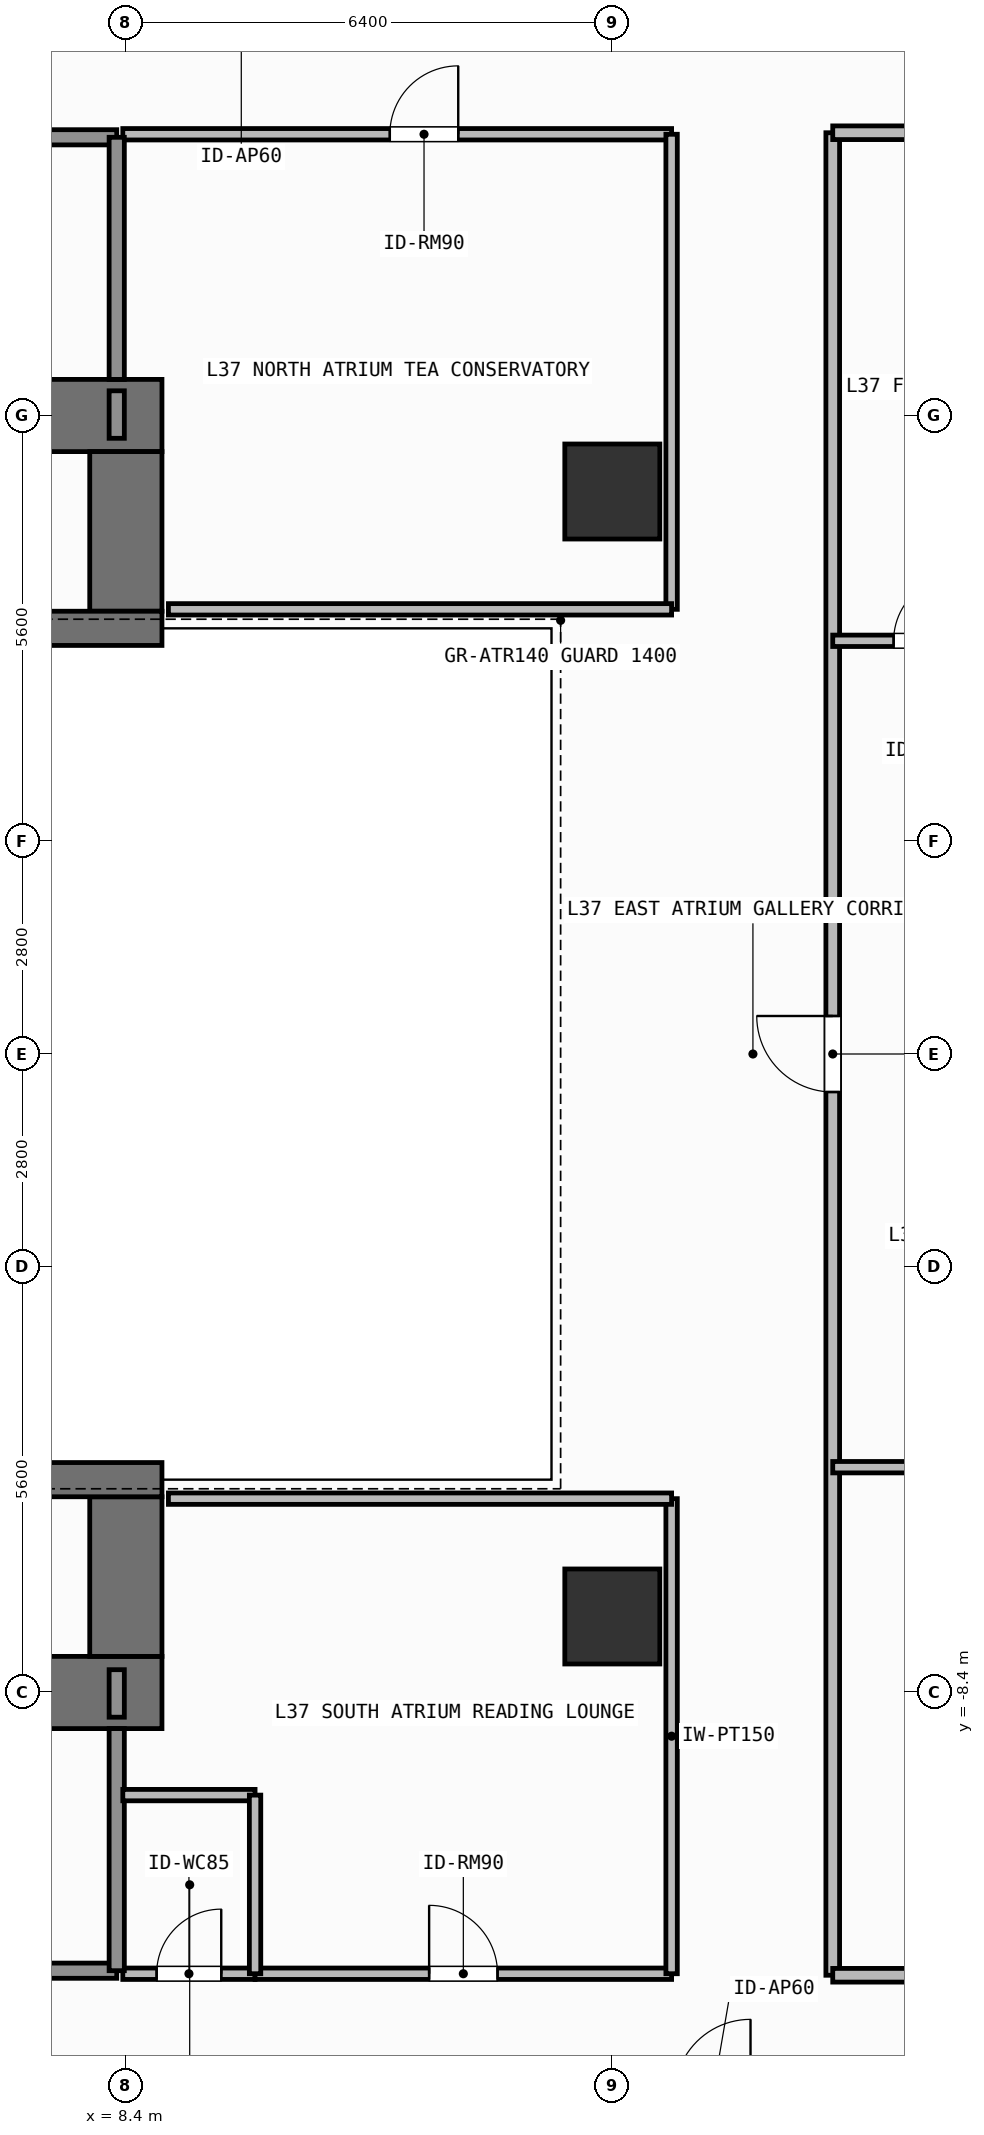
"""IFC4 building model, lengths in metres.
Left out: names, types, materials, properties, quantities, classifications, styles, units other than length and angle.
Written with IfcOpenShell. Run it as: python <this file> out.ifc"""

import sys

from ifc_helpers import new_model, si_unit, direction, frame, frame_2d, origin, origin_2d, place, context, subcontext, project, spatial, rectangle, extrude, element, fill, save


model = new_model("IFC4")
c1 = context("Model", 3, precision=1e-05, world=origin(), true_north=direction((0.0, 1.0)))
c2 = subcontext(c1, "Body", "Model", "MODEL_VIEW")
j1 = project(units=[si_unit("LENGTHUNIT", "METRE"), si_unit("PLANEANGLEUNIT", "RADIAN")], contexts=[c1])
p1 = place(None, origin())
s1 = spatial("IfcSite", under=j1, at=p1, CompositionType="ELEMENT")
p2 = place(p1, origin())
s2 = spatial("IfcBuilding", under=s1, at=p2, CompositionType="ELEMENT")
p3 = place(p2, frame((0.0, 0.0, 148.5)))
s3 = spatial("IfcBuildingStorey", under=s2, at=p3, CompositionType="ELEMENT", Elevation=148.5)
p4 = place(p3, frame((6.12, -8.4, 0.0), z_axis=(0.0, 0.0, 1.0), x_axis=(1.0, 0.0, 0.0)))
e1 = element("IfcWall", 1, at=p4, inside=s3, PredefinedType="SHEAR", context=c2, shape_type="SweptSolid", body=[
    extrude(rectangle(XDim=2.755, YDim=0.95, at=frame_2d((1.377, 0.0))), origin(), (0.0, 0.0, 1.0), 3.9),
])
p5 = place(p3, frame((-7.55, 8.4, 0.0), z_axis=(0.0, 0.0, 1.0), x_axis=(1.0, 0.0, 0.0)))
e2 = element("IfcWall", 2, at=p5, inside=s3, PredefinedType="SHEAR", context=c2, shape_type="SweptSolid", body=[
    extrude(rectangle(XDim=16.425, YDim=0.95, at=frame_2d((8.212, 0.0))), origin(), (0.0, 0.0, 1.0), 3.9),
])
for number, where, z_axis, x_axis in (
    (3, (8.4, -7.925, 0.0), (0.0, 0.0, 1.0), (0.0, 1.0, 0.0)),
    (4, (8.4, 5.825, 0.0), (0.0, 0.0, 1.0), (0.0, 1.0, 0.0)),
):
    element("IfcWall", number, at=place(p3, frame(where, z_axis=z_axis, x_axis=x_axis)), inside=s3, PredefinedType="SHEAR", context=c2, shape_type="SweptSolid", body=[
        extrude(rectangle(XDim=2.1, YDim=0.95, at=frame_2d((1.05, 0.0))), origin(), (0.0, 0.0, 1.0), 3.9),
    ])
for number, where, z_axis, x_axis in (
    (5, (3.045, -5.6, 0.0), (0.0, 0.0, 1.0), (1.0, 0.0, 0.0)),
    (6, (3.045, 5.6, 0.0), (0.0, 0.0, 1.0), (1.0, 0.0, 0.0)),
):
    element("IfcWall", number, at=place(p3, frame(where, z_axis=z_axis, x_axis=x_axis)), inside=s3, PredefinedType="SHEAR", context=c2, shape_type="SweptSolid", body=[
        extrude(rectangle(XDim=5.83, YDim=0.45, at=frame_2d((2.915, 0.0))), origin(), (0.0, 0.0, 1.0), 3.9),
    ])
for number, where, z_axis, x_axis in (
    (7, (14.8, -7.4, 0.0), (0.0, 0.0, 1.0), (1.0, 0.0, 0.0)),
    (8, (14.8, 7.4, 0.0), (0.0, 0.0, 1.0), (1.0, 0.0, 0.0)),
):
    element("IfcColumn", number, at=place(p3, frame(where, z_axis=z_axis, x_axis=x_axis)), inside=s3, PredefinedType="COLUMN", context=c2, shape_type="SweptSolid", body=[
        extrude(rectangle(XDim=1.25, YDim=1.25, at=origin_2d()), origin(), (0.0, 0.0, 1.0), 3.9),
    ])
p6 = place(p3, frame((4.58, -12.06, 0.0), z_axis=(0.0, 0.0, 1.0), x_axis=(1.0, 0.0, 0.0)))
e9 = element("IfcWall", 9, at=p6, inside=s3, PredefinedType="SOLIDWALL", context=c2, shape_type="SweptSolid", body=[
    extrude(rectangle(XDim=3.7, YDim=0.2, at=frame_2d((1.85, 0.0))), origin(), (0.0, 0.0, 1.0), 3.68),
])
p7 = place(p6, frame((1.212, 0.0, 0.0)))
e10 = element("IfcOpeningElement", 10, at=p7, cuts=e9, PredefinedType="OPENING", context=c2, shape_type="SweptSolid", body=[
    extrude(rectangle(XDim=1.1, YDim=2.15, at=frame_2d((0.55, 1.075))), frame((0.0, 0.11, 0.0), z_axis=(0.0, -1.0, 0.0), x_axis=(1.0, 0.0, 0.0)), (0.0, 0.0, 1.0), 0.22),
])
p8 = place(p3, frame((4.58, 12.06, 0.0), z_axis=(0.0, 0.0, 1.0), x_axis=(1.0, 0.0, 0.0)))
e11 = element("IfcWall", 11, at=p8, inside=s3, PredefinedType="SOLIDWALL", context=c2, shape_type="SweptSolid", body=[
    extrude(rectangle(XDim=3.7, YDim=0.2, at=frame_2d((1.85, 0.0))), origin(), (0.0, 0.0, 1.0), 3.68),
])
p9 = place(p8, frame((1.212, 0.0, 0.0)))
e12 = element("IfcOpeningElement", 12, at=p9, cuts=e11, PredefinedType="OPENING", context=c2, shape_type="SweptSolid", body=[
    extrude(rectangle(XDim=1.1, YDim=2.15, at=frame_2d((0.55, 1.075))), frame((0.0, 0.11, 0.0), z_axis=(0.0, -1.0, 0.0), x_axis=(1.0, 0.0, 0.0)), (0.0, 0.0, 1.0), 0.22),
])
p10 = place(p3, frame((8.36, -12.1, 0.0), z_axis=(0.0, 0.0, 1.0), x_axis=(1.0, 0.0, 0.0)))
e13 = element("IfcWall", 13, at=p10, inside=s3, PredefinedType="PARTITIONING", context=c2, shape_type="SweptSolid", body=[
    extrude(rectangle(XDim=1.74, YDim=0.15, at=frame_2d((0.87, 0.0))), origin(), (0.0, 0.0, 1.0), 3.68),
])
p11 = place(p10, frame((0.445, 0.0, 0.0)))
e14 = element("IfcOpeningElement", 14, at=p11, cuts=e13, PredefinedType="OPENING", context=c2, shape_type="SweptSolid", body=[
    extrude(rectangle(XDim=0.85, YDim=2.1, at=frame_2d((0.425, 1.05))), frame((0.0, 0.085, 0.0), z_axis=(0.0, -1.0, 0.0), x_axis=(1.0, 0.0, 0.0)), (0.0, 0.0, 1.0), 0.17),
])
p12 = place(p3, frame((10.1, -12.1, 0.0), z_axis=(0.0, 0.0, 1.0), x_axis=(1.0, 0.0, 0.0)))
e15 = element("IfcWall", 15, at=p12, inside=s3, PredefinedType="PARTITIONING", context=c2, shape_type="SweptSolid", body=[
    extrude(rectangle(XDim=5.48, YDim=0.15, at=frame_2d((2.74, 0.0))), origin(), (0.0, 0.0, 1.0), 3.68),
])
p13 = place(p12, frame((2.29, 0.0, 0.0)))
e16 = element("IfcOpeningElement", 16, at=p13, cuts=e15, PredefinedType="OPENING", context=c2, shape_type="SweptSolid", body=[
    extrude(rectangle(XDim=0.9, YDim=2.1, at=frame_2d((0.45, 1.05))), frame((0.0, 0.085, 0.0), z_axis=(0.0, -1.0, 0.0), x_axis=(1.0, 0.0, 0.0)), (0.0, 0.0, 1.0), 0.17),
])
p14 = place(p3, frame((8.36, 12.1, 0.0), z_axis=(0.0, 0.0, 1.0), x_axis=(1.0, 0.0, 0.0)))
e17 = element("IfcWall", 17, at=p14, inside=s3, PredefinedType="PARTITIONING", context=c2, shape_type="SweptSolid", body=[
    extrude(rectangle(XDim=7.22, YDim=0.15, at=frame_2d((3.61, 0.0))), origin(), (0.0, 0.0, 1.0), 3.68),
])
p15 = place(p14, frame((3.513, 0.0, 0.0)))
e18 = element("IfcOpeningElement", 18, at=p15, cuts=e17, PredefinedType="OPENING", context=c2, shape_type="SweptSolid", body=[
    extrude(rectangle(XDim=0.9, YDim=2.1, at=frame_2d((0.45, 1.05))), frame((0.0, 0.085, 0.0), z_axis=(0.0, -1.0, 0.0), x_axis=(1.0, 0.0, 0.0)), (0.0, 0.0, 1.0), 0.17),
])
p16 = place(p3, frame((17.7, -12.12, 0.0), z_axis=(0.0, 0.0, 1.0), x_axis=(0.0, 1.0, 0.0)))
e19 = element("IfcWall", 19, at=p16, inside=s3, PredefinedType="PARTITIONING", context=c2, shape_type="SweptSolid", body=[
    extrude(rectangle(XDim=24.24, YDim=0.18, at=frame_2d((12.12, 0.0))), origin(), (0.0, 0.0, 1.0), 3.68),
])
p17 = place(p16, frame((11.62, 0.0, 0.0)))
e20 = element("IfcOpeningElement", 20, at=p17, cuts=e19, PredefinedType="OPENING", context=c2, shape_type="SweptSolid", body=[
    extrude(rectangle(XDim=1.0, YDim=2.2, at=frame_2d((0.5, 1.1))), frame((0.0, 0.1, 0.0), z_axis=(0.0, -1.0, 0.0), x_axis=(1.0, 0.0, 0.0)), (0.0, 0.0, 1.0), 0.2),
])
p18 = place(p3, frame((17.7, 5.436, 0.0), z_axis=(0.0, 0.0, 1.0), x_axis=(1.0, 0.0, 0.0)))
e21 = element("IfcWall", 21, at=p18, inside=s3, PredefinedType="PARTITIONING", context=c2, shape_type="SweptSolid", body=[
    extrude(rectangle(XDim=2.292, YDim=0.15, at=frame_2d((1.146, 0.0))), origin(), (0.0, 0.0, 1.0), 3.68),
])
p19 = place(p18, frame((0.801, 0.0, 0.0)))
e22 = element("IfcOpeningElement", 22, at=p19, cuts=e21, PredefinedType="OPENING", context=c2, shape_type="SweptSolid", body=[
    extrude(rectangle(XDim=0.85, YDim=2.1, at=frame_2d((0.425, 1.05))), frame((0.0, 0.085, 0.0), z_axis=(0.0, -1.0, 0.0), x_axis=(1.0, 0.0, 0.0)), (0.0, 0.0, 1.0), 0.17),
])
p20 = place(p3, frame((17.7, -5.436, 0.0), z_axis=(0.0, 0.0, 1.0), x_axis=(1.0, 0.0, 0.0)))
e23 = element("IfcWall", 23, at=p20, inside=s3, PredefinedType="PARTITIONING", context=c2, shape_type="SweptSolid", body=[
    extrude(rectangle(XDim=5.59, YDim=0.15, at=frame_2d((2.795, 0.0))), origin(), (0.0, 0.0, 1.0), 3.68),
])
p21 = place(p20, frame((2.458, 0.0, 0.0)))
e24 = element("IfcOpeningElement", 24, at=p21, cuts=e23, PredefinedType="OPENING", context=c2, shape_type="SweptSolid", body=[
    extrude(rectangle(XDim=0.85, YDim=2.1, at=frame_2d((0.425, 1.05))), frame((0.0, 0.085, 0.0), z_axis=(0.0, -1.0, 0.0), x_axis=(1.0, 0.0, 0.0)), (0.0, 0.0, 1.0), 0.17),
])
for number, where, z_axis, x_axis in (
    (25, (8.28, -12.06, 0.0), (0.0, 0.0, 1.0), (0.0, 1.0, 0.0)),
    (26, (8.28, 8.875, 0.0), (0.0, 0.0, 1.0), (0.0, 1.0, 0.0)),
):
    element("IfcWall", number, at=place(p3, frame(where, z_axis=z_axis, x_axis=x_axis)), inside=s3, PredefinedType="SOLIDWALL", context=c2, shape_type="SweptSolid", body=[
        extrude(rectangle(XDim=3.185, YDim=0.2, at=frame_2d((1.593, 0.0))), origin(), (0.0, 0.0, 1.0), 3.68),
    ])
p22 = place(p3, frame((8.28, -8.725, 0.0), z_axis=(0.0, 0.0, 1.0), x_axis=(0.0, 1.0, 0.0)))
e27 = element("IfcWall", 27, at=p22, inside=s3, PredefinedType="SOLIDWALL", context=c2, shape_type="SweptSolid", body=[
    extrude(rectangle(XDim=0.625, YDim=0.2, at=frame_2d((0.312, 0.0))), origin(), (0.0, 0.0, 1.0), 3.68),
])
p23 = place(p3, frame((8.36, -9.75, 0.0), z_axis=(0.0, 0.0, 1.0), x_axis=(1.0, 0.0, 0.0)))
e28 = element("IfcWall", 28, at=p23, inside=s3, PredefinedType="PARTITIONING", context=c2, shape_type="SweptSolid", body=[
    extrude(rectangle(XDim=1.74, YDim=0.15, at=frame_2d((0.87, 0.0))), origin(), (0.0, 0.0, 1.0), 3.68),
])
p24 = place(p3, frame((10.1, -12.1, 0.0), z_axis=(0.0, 0.0, 1.0), x_axis=(0.0, 1.0, 0.0)))
e29 = element("IfcWall", 29, at=p24, inside=s3, PredefinedType="PARTITIONING", context=c2, shape_type="SweptSolid", body=[
    extrude(rectangle(XDim=2.35, YDim=0.15, at=frame_2d((1.175, 0.0))), origin(), (0.0, 0.0, 1.0), 3.68),
])
p25 = place(p3, frame((15.58, -12.1, 0.0), z_axis=(0.0, 0.0, 1.0), x_axis=(0.0, 1.0, 0.0)))
e30 = element("IfcWall", 30, at=p25, inside=s3, PredefinedType="PARTITIONING", context=c2, shape_type="SweptSolid", body=[
    extrude(rectangle(XDim=6.25, YDim=0.15, at=frame_2d((3.125, 0.0))), origin(), (0.0, 0.0, 1.0), 3.68),
])
p26 = place(p3, frame((8.96, -5.85, 0.0), z_axis=(0.0, 0.0, 1.0), x_axis=(1.0, 0.0, 0.0)))
e31 = element("IfcWall", 31, at=p26, inside=s3, PredefinedType="PARTITIONING", context=c2, shape_type="SweptSolid", body=[
    extrude(rectangle(XDim=6.62, YDim=0.15, at=frame_2d((3.31, 0.0))), origin(), (0.0, 0.0, 1.0), 3.68),
])
p27 = place(p3, frame((8.28, 8.1, 0.0), z_axis=(0.0, 0.0, 1.0), x_axis=(0.0, 1.0, 0.0)))
e32 = element("IfcWall", 32, at=p27, inside=s3, PredefinedType="SOLIDWALL", context=c2, shape_type="SweptSolid", body=[
    extrude(rectangle(XDim=0.625, YDim=0.2, at=frame_2d((0.312, 0.0))), origin(), (0.0, 0.0, 1.0), 3.68),
])
p28 = place(p3, frame((15.58, 5.85, 0.0), z_axis=(0.0, 0.0, 1.0), x_axis=(0.0, 1.0, 0.0)))
e33 = element("IfcWall", 33, at=p28, inside=s3, PredefinedType="PARTITIONING", context=c2, shape_type="SweptSolid", body=[
    extrude(rectangle(XDim=6.25, YDim=0.15, at=frame_2d((3.125, 0.0))), origin(), (0.0, 0.0, 1.0), 3.68),
])
p29 = place(p3, frame((8.96, 5.85, 0.0), z_axis=(0.0, 0.0, 1.0), x_axis=(1.0, 0.0, 0.0)))
e34 = element("IfcWall", 34, at=p29, inside=s3, PredefinedType="PARTITIONING", context=c2, shape_type="SweptSolid", body=[
    extrude(rectangle(XDim=6.62, YDim=0.15, at=frame_2d((3.31, 0.0))), origin(), (0.0, 0.0, 1.0), 3.68),
])
for number, where, z_axis, x_axis in (
    (35, (17.7, -12.12, 0.0), (0.0, 0.0, 1.0), (1.0, 0.0, 0.0)),
    (36, (17.7, 12.12, 0.0), (0.0, 0.0, 1.0), (1.0, 0.0, 0.0)),
):
    element("IfcWall", number, at=place(p3, frame(where, z_axis=z_axis, x_axis=x_axis)), inside=s3, PredefinedType="PARTITIONING", context=c2, shape_type="SweptSolid", body=[
        extrude(rectangle(XDim=9.83, YDim=0.18, at=frame_2d((4.915, 0.0))), origin(), (0.0, 0.0, 1.0), 3.68),
    ])
p30 = place(p11, origin())
e37 = element("IfcDoor", 37, at=p30, inside=s3, OperationType="SINGLE_SWING_RIGHT", PredefinedType="DOOR", context=c2, shape_type="SweptSolid", body=[
    extrude(rectangle(XDim=0.85, YDim=2.1, at=frame_2d((0.425, 1.05))), frame((0.0, 0.025, 0.0), z_axis=(0.0, -1.0, 0.0), x_axis=(1.0, 0.0, 0.0)), (0.0, 0.0, 1.0), 0.05),
])
fill(e14, e37)
p31 = place(p13, origin())
e38 = element("IfcDoor", 38, at=p31, inside=s3, OperationType="SINGLE_SWING_LEFT", PredefinedType="DOOR", context=c2, shape_type="SweptSolid", body=[
    extrude(rectangle(XDim=0.9, YDim=2.1, at=frame_2d((0.45, 1.05))), frame((0.0, 0.025, 0.0), z_axis=(0.0, -1.0, 0.0), x_axis=(1.0, 0.0, 0.0)), (0.0, 0.0, 1.0), 0.05),
])
fill(e16, e38)
p32 = place(p15, origin())
e39 = element("IfcDoor", 39, at=p32, inside=s3, OperationType="SINGLE_SWING_RIGHT", PredefinedType="DOOR", context=c2, shape_type="SweptSolid", body=[
    extrude(rectangle(XDim=0.9, YDim=2.1, at=frame_2d((0.45, 1.05))), frame((0.0, 0.025, 0.0), z_axis=(0.0, -1.0, 0.0), x_axis=(1.0, 0.0, 0.0)), (0.0, 0.0, 1.0), 0.05),
])
fill(e18, e39)
p33 = place(p17, origin())
e40 = element("IfcDoor", 40, at=p33, inside=s3, OperationType="SINGLE_SWING_RIGHT", PredefinedType="DOOR", context=c2, shape_type="SweptSolid", body=[
    extrude(rectangle(XDim=1.0, YDim=2.2, at=frame_2d((0.5, 1.1))), frame((0.0, 0.025, 0.0), z_axis=(0.0, -1.0, 0.0), x_axis=(1.0, 0.0, 0.0)), (0.0, 0.0, 1.0), 0.05),
])
fill(e20, e40)
p34 = place(p19, origin())
e41 = element("IfcDoor", 41, at=p34, inside=s3, OperationType="SINGLE_SWING_RIGHT", PredefinedType="DOOR", context=c2, shape_type="SweptSolid", body=[
    extrude(rectangle(XDim=0.85, YDim=2.1, at=frame_2d((0.425, 1.05))), frame((0.0, 0.025, 0.0), z_axis=(0.0, -1.0, 0.0), x_axis=(1.0, 0.0, 0.0)), (0.0, 0.0, 1.0), 0.05),
])
fill(e22, e41)
save(model, sys.argv[1])
